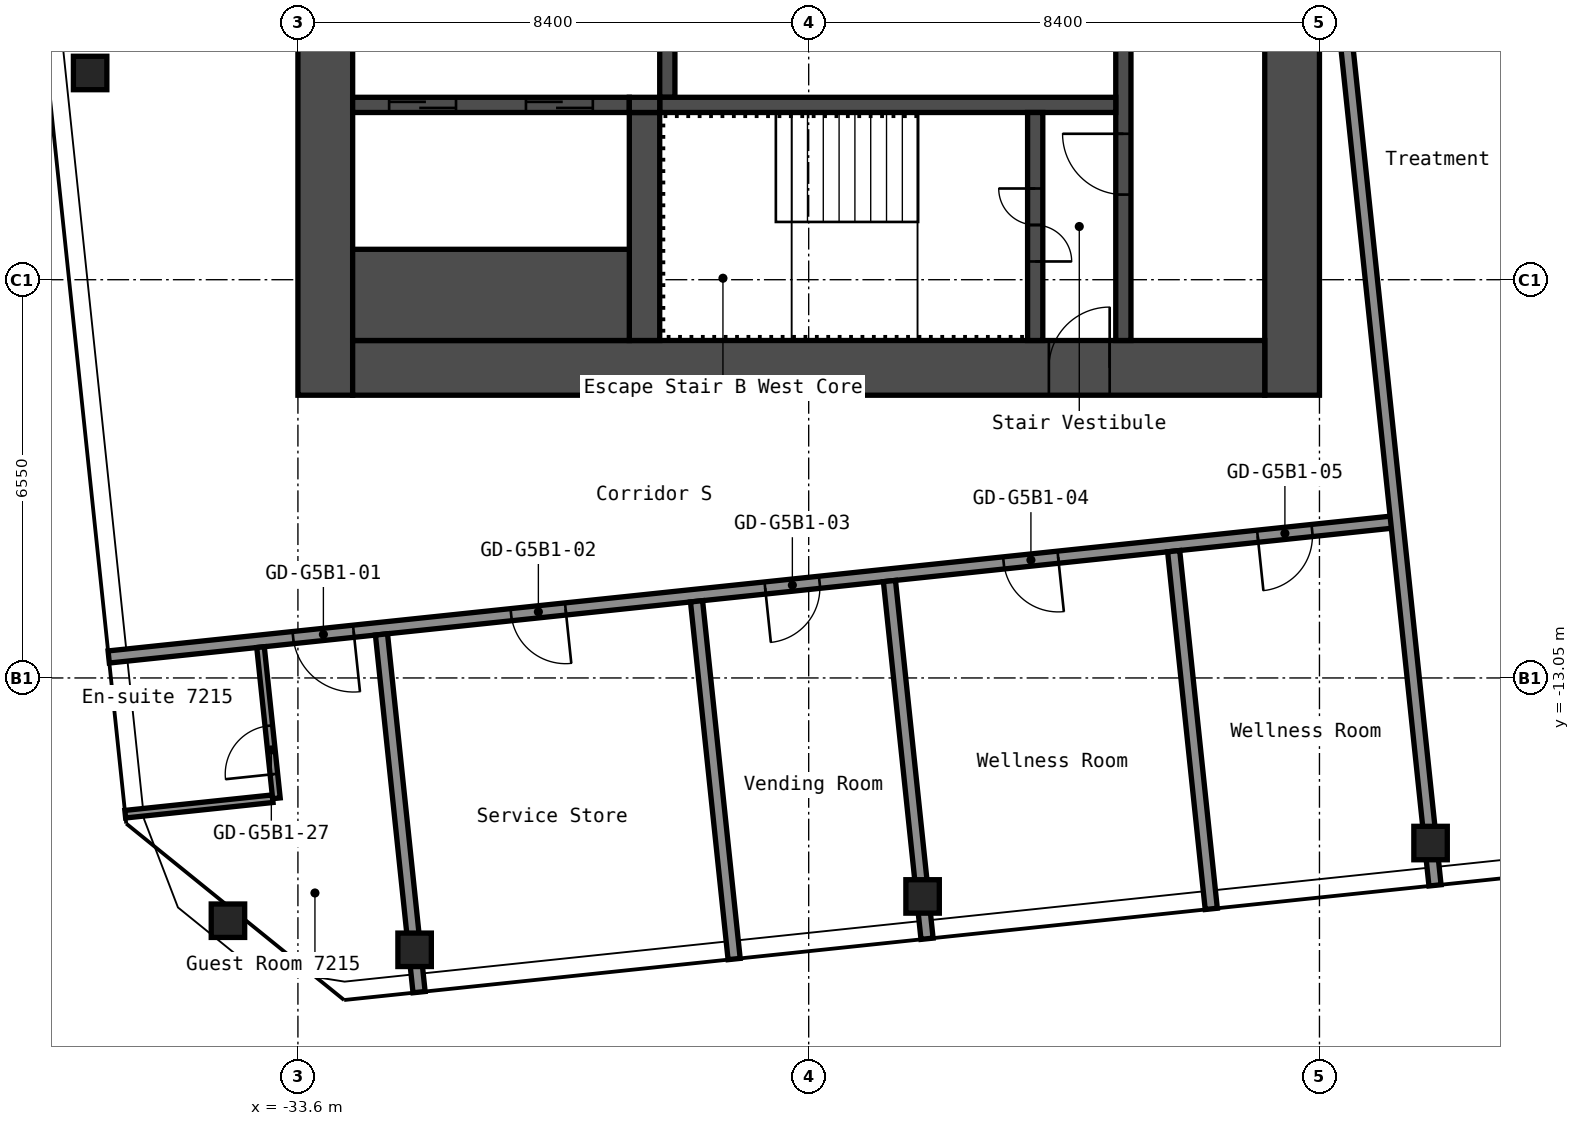
"""IFC4 building model, lengths in metres.
Left out: names, types, materials, properties, quantities, classifications, styles, units other than length and angle.
Written with IfcOpenShell. Run it as: python <this file> out.ifc"""

import sys

from ifc_helpers import new_model, si_unit, direction, frame, frame_2d, origin, origin_2d, place, context, subcontext, project, spatial, rectangle, hollow_rectangle, extrude, element, fill, save


model = new_model("IFC4")
c1 = context("Model", 3, precision=1e-05, world=origin(), true_north=direction((0.0, 1.0)))
c2 = subcontext(c1, "Body", "Model", "MODEL_VIEW")
j1 = project(units=[si_unit("LENGTHUNIT", "METRE"), si_unit("PLANEANGLEUNIT", "RADIAN")], contexts=[c1])
p1 = place(None, origin())
s1 = spatial("IfcSite", under=j1, at=p1, CompositionType="ELEMENT")
p2 = place(p1, origin())
s2 = spatial("IfcBuilding", under=s1, at=p2, CompositionType="ELEMENT")
p3 = place(p2, frame((0.0, 0.0, 255.0)))
s3 = spatial("IfcBuildingStorey", under=s2, at=p3, CompositionType="ELEMENT", Elevation=255.0)
for number, where, z_axis, x_axis in (
    (1, (-34.751, -17.042, 0.0), (0.0, 0.0, 1.0), (1.0, 0.0, 0.0)),
    (2, (-37.017, -3.1, 0.0), (0.0, 0.0, 1.0), (1.0, 0.0, 0.0)),
    (3, (-31.681, -17.521, 0.0), (0.0, 0.0, 1.0), (1.0, 0.0, 0.0)),
    (4, (-23.327, -16.643, 0.0), (0.0, 0.0, 1.0), (1.0, 0.0, 0.0)),
    (5, (-14.973, -15.765, 0.0), (0.0, 0.0, 1.0), (1.0, 0.0, 0.0)),
):
    element("IfcColumn", number, at=place(p3, frame(where, z_axis=z_axis, x_axis=x_axis)), inside=s3, PredefinedType="COLUMN", context=c2, shape_type="SweptSolid", body=[
        extrude(hollow_rectangle(XDim=0.55, YDim=0.55, WallThickness=0.022, InnerFilletRadius=0.033, OuterFilletRadius=0.055, at=origin_2d()), origin(), (0.0, 0.0, 1.0), 2.75),
    ])
p4 = place(p3, frame((-17.25, -8.4, 0.0), z_axis=(0.0, 0.0, 1.0), x_axis=(0.0, 1.0, 0.0)))
e6 = element("IfcWall", 6, at=p4, inside=s3, PredefinedType="SHEAR", context=c2, shape_type="SweptSolid", body=[
    extrude(rectangle(XDim=16.8, YDim=0.9, at=frame_2d((8.4, 0.0))), origin(), (0.0, 0.0, 1.0), 2.75),
])
p5 = place(p4, frame((8.321, 0.0, 0.0)))
e7 = element("IfcOpeningElement", 7, at=p5, cuts=e6, PredefinedType="OPENING", context=c2, shape_type="SweptSolid", body=[
    extrude(rectangle(XDim=1.6, YDim=2.1, at=frame_2d((0.8, 1.05))), frame((0.0, 0.46, 0.0), z_axis=(0.0, -1.0, 0.0), x_axis=(1.0, 0.0, 0.0)), (0.0, 0.0, 1.0), 0.92),
])
p6 = place(p3, frame((-33.15, -8.4, 0.0), z_axis=(0.0, 0.0, 1.0), x_axis=(0.0, 1.0, 0.0)))
e8 = element("IfcWall", 8, at=p6, inside=s3, PredefinedType="SHEAR", context=c2, shape_type="SweptSolid", body=[
    extrude(rectangle(XDim=16.8, YDim=0.9, at=frame_2d((8.4, 0.0))), origin(), (0.0, 0.0, 1.0), 2.75),
])
p7 = place(p3, frame((-32.7, -7.95, 0.0), z_axis=(0.0, 0.0, 1.0), x_axis=(1.0, 0.0, 0.0)))
e9 = element("IfcWall", 9, at=p7, inside=s3, PredefinedType="SHEAR", context=c2, shape_type="SweptSolid", body=[
    extrude(rectangle(XDim=15.0, YDim=0.9, at=frame_2d((7.5, 0.0))), origin(), (0.0, 0.0, 1.0), 2.75),
])
p8 = place(p7, frame((11.45, 0.0, 0.0)))
e10 = element("IfcOpeningElement", 10, at=p8, cuts=e9, PredefinedType="OPENING", context=c2, shape_type="SweptSolid", body=[
    extrude(rectangle(XDim=1.0, YDim=2.1, at=frame_2d((0.5, 1.05))), frame((0.0, 0.46, 0.0), z_axis=(0.0, -1.0, 0.0), x_axis=(1.0, 0.0, 0.0)), (0.0, 0.0, 1.0), 0.92),
])
p9 = place(p3, frame((-20.025, -7.5, 0.0), z_axis=(0.0, 0.0, 1.0), x_axis=(0.0, 1.0, 0.0)))
e11 = element("IfcWall", 11, at=p9, inside=s3, PredefinedType="SHEAR", context=c2, shape_type="SweptSolid", body=[
    extrude(rectangle(XDim=6.3, YDim=0.25, at=frame_2d((3.15, 0.0))), origin(), (0.0, 0.0, 1.0), 2.75),
])
p10 = place(p9, frame((2.4, 0.0, 0.0)))
e12 = element("IfcOpeningElement", 12, at=p10, cuts=e11, PredefinedType="OPENING", context=c2, shape_type="SweptSolid", body=[
    extrude(rectangle(XDim=1.0, YDim=2.1, at=frame_2d((0.5, 1.05))), frame((0.0, 0.135, 0.0), z_axis=(0.0, -1.0, 0.0), x_axis=(1.0, 0.0, 0.0)), (0.0, 0.0, 1.0), 0.27),
])
p11 = place(p3, frame((-27.525, -3.5, 0.0), z_axis=(0.0, 0.0, 1.0), x_axis=(0.0, 1.0, 0.0)))
e13 = element("IfcWall", 13, at=p11, inside=s3, PredefinedType="SHEAR", context=c2, shape_type="SweptSolid", body=[
    extrude(rectangle(XDim=2.05, YDim=0.25, at=frame_2d((1.025, 0.0))), origin(), (0.0, 0.0, 1.0), 2.75),
])
p12 = place(p3, frame((-27.65, -3.625, 0.0), z_axis=(0.0, 0.0, 1.0), x_axis=(1.0, 0.0, 0.0)))
e14 = element("IfcWall", 14, at=p12, inside=s3, PredefinedType="SHEAR", context=c2, shape_type="SweptSolid", body=[
    extrude(rectangle(XDim=7.5, YDim=0.25, at=frame_2d((3.75, 0.0))), origin(), (0.0, 0.0, 1.0), 2.75),
])
p13 = place(p3, frame((-21.475, -7.5, 0.0), z_axis=(0.0, 0.0, 1.0), x_axis=(0.0, 1.0, 0.0)))
e15 = element("IfcWall", 15, at=p13, inside=s3, PredefinedType="SHEAR", context=c2, shape_type="SweptSolid", body=[
    extrude(rectangle(XDim=3.75, YDim=0.25, at=frame_2d((1.875, 0.0))), origin(), (0.0, 0.0, 1.0), 2.75),
])
p14 = place(p13, frame((1.3, 0.0, 0.0)))
e16 = element("IfcOpeningElement", 16, at=p14, cuts=e15, PredefinedType="OPENING", context=c2, shape_type="SweptSolid", body=[
    extrude(rectangle(XDim=1.2, YDim=2.1, at=frame_2d((0.6, 1.05))), frame((0.0, 0.135, 0.0), z_axis=(0.0, -1.0, 0.0), x_axis=(1.0, 0.0, 0.0)), (0.0, 0.0, 1.0), 0.27),
])
p15 = place(p3, frame((-27.9, -7.5, 0.0), z_axis=(0.0, 0.0, 1.0), x_axis=(0.0, 1.0, 0.0)))
e17 = element("IfcWall", 17, at=p15, inside=s3, PredefinedType="SHEAR", context=c2, shape_type="SweptSolid", body=[
    extrude(rectangle(XDim=3.75, YDim=0.5, at=frame_2d((1.875, 0.0))), origin(), (0.0, 0.0, 1.0), 2.75),
])
p16 = place(p3, frame((-32.7, -3.625, 0.0), z_axis=(0.0, 0.0, 1.0), x_axis=(1.0, 0.0, 0.0)))
e18 = element("IfcWall", 18, at=p16, inside=s3, PredefinedType="SHEAR", context=c2, shape_type="SweptSolid", body=[
    extrude(rectangle(XDim=4.55, YDim=0.25, at=frame_2d((2.275, 0.0))), origin(), (0.0, 0.0, 1.0), 2.75),
])
p17 = place(p16, frame((2.85, 0.0, 0.0)))
e19 = element("IfcOpeningElement", 19, at=p17, cuts=e18, PredefinedType="OPENING", context=c2, shape_type="SweptSolid", body=[
    extrude(rectangle(XDim=1.1, YDim=2.1, at=frame_2d((0.55, 1.05))), frame((0.0, 0.135, 0.0), z_axis=(0.0, -1.0, 0.0), x_axis=(1.0, 0.0, 0.0)), (0.0, 0.0, 1.0), 0.27),
])
p18 = place(p16, frame((0.6, 0.0, 0.0)))
e20 = element("IfcOpeningElement", 20, at=p18, cuts=e18, PredefinedType="OPENING", context=c2, shape_type="SweptSolid", body=[
    extrude(rectangle(XDim=1.1, YDim=2.1, at=frame_2d((0.55, 1.05))), frame((0.0, 0.135, 0.0), z_axis=(0.0, -1.0, 0.0), x_axis=(1.0, 0.0, 0.0)), (0.0, 0.0, 1.0), 0.27),
])
p19 = place(p3, frame((-32.7, -6.75, 0.0), z_axis=(0.0, 0.0, 1.0), x_axis=(1.0, 0.0, 0.0)))
e21 = element("IfcWall", 21, at=p19, inside=s3, PredefinedType="SHEAR", context=c2, shape_type="SweptSolid", body=[
    extrude(rectangle(XDim=4.55, YDim=1.5, at=frame_2d((2.275, 0.0))), origin(), (0.0, 0.0, 1.0), 2.75),
])
p20 = place(p3, frame((-28.15, -3.625, 0.0), z_axis=(0.0, 0.0, 1.0), x_axis=(1.0, 0.0, 0.0)))
e22 = element("IfcWall", 22, at=p20, inside=s3, PredefinedType="SHEAR", context=c2, shape_type="SweptSolid", body=[
    extrude(rectangle(XDim=0.5, YDim=0.25, at=frame_2d((0.25, 0.0))), origin(), (0.0, 0.0, 1.0), 2.75),
])
p21 = place(p3, frame((-36.44, -15.291, 0.0), z_axis=(0.0, 0.0, 1.0), x_axis=(0.994517520739, 0.10457007671, 0.0)))
e23 = element("IfcWall", 23, at=p21, inside=s3, PredefinedType="PARTITIONING", context=c2, shape_type="SweptSolid", body=[
    extrude(rectangle(XDim=2.438, YDim=0.125, at=frame_2d((1.219, 0.0))), origin(), (0.0, 0.0, 1.0), 2.75),
])
p22 = place(p3, frame((-36.712, -12.705, 0.0), z_axis=(0.0, 0.0, 1.0), x_axis=(0.994522460242, 0.104523088709, 0.0)))
e24 = element("IfcWall", 24, at=p22, inside=s3, PredefinedType="PARTITIONING", context=c2, shape_type="SweptSolid", body=[
    extrude(rectangle(XDim=21.3, YDim=0.2, at=frame_2d((10.65, 0.0))), origin(), (0.0, 0.0, 1.0), 2.75),
])
p23 = place(p22, frame((3.05, 0.0, 0.0)))
e25 = element("IfcOpeningElement", 25, at=p23, cuts=e24, PredefinedType="OPENING", context=c2, shape_type="SweptSolid", body=[
    extrude(rectangle(XDim=1.0, YDim=2.1, at=frame_2d((0.5, 1.05))), frame((0.0, 0.11, 0.0), z_axis=(0.0, -1.0, 0.0), x_axis=(1.0, 0.0, 0.0)), (0.0, 0.0, 1.0), 0.22),
])
p24 = place(p22, frame((6.655, 0.0, 0.0)))
e26 = element("IfcOpeningElement", 26, at=p24, cuts=e24, PredefinedType="OPENING", context=c2, shape_type="SweptSolid", body=[
    extrude(rectangle(XDim=0.9, YDim=2.1, at=frame_2d((0.45, 1.05))), frame((0.0, 0.11, 0.0), z_axis=(0.0, -1.0, 0.0), x_axis=(1.0, 0.0, 0.0)), (0.0, 0.0, 1.0), 0.22),
])
p25 = place(p22, frame((10.855, 0.0, 0.0)))
e27 = element("IfcOpeningElement", 27, at=p25, cuts=e24, PredefinedType="OPENING", context=c2, shape_type="SweptSolid", body=[
    extrude(rectangle(XDim=0.9, YDim=2.1, at=frame_2d((0.45, 1.05))), frame((0.0, 0.11, 0.0), z_axis=(0.0, -1.0, 0.0), x_axis=(1.0, 0.0, 0.0)), (0.0, 0.0, 1.0), 0.22),
])
p26 = place(p22, frame((14.8, 0.0, 0.0)))
e28 = element("IfcOpeningElement", 28, at=p26, cuts=e24, PredefinedType="OPENING", context=c2, shape_type="SweptSolid", body=[
    extrude(rectangle(XDim=0.9, YDim=2.1, at=frame_2d((0.45, 1.05))), frame((0.0, 0.11, 0.0), z_axis=(0.0, -1.0, 0.0), x_axis=(1.0, 0.0, 0.0)), (0.0, 0.0, 1.0), 0.22),
])
p27 = place(p22, frame((19.0, 0.0, 0.0)))
e29 = element("IfcOpeningElement", 29, at=p27, cuts=e24, PredefinedType="OPENING", context=c2, shape_type="SweptSolid", body=[
    extrude(rectangle(XDim=0.9, YDim=2.1, at=frame_2d((0.45, 1.05))), frame((0.0, 0.11, 0.0), z_axis=(0.0, -1.0, 0.0), x_axis=(1.0, 0.0, 0.0)), (0.0, 0.0, 1.0), 0.22),
])
p28 = place(p3, frame((-33.954, -15.029, 0.0), z_axis=(0.0, 0.0, 1.0), x_axis=(-0.104588199498, 0.994515615024, 0.0)))
e30 = element("IfcWall", 30, at=p28, inside=s3, PredefinedType="PARTITIONING", context=c2, shape_type="SweptSolid", body=[
    extrude(rectangle(XDim=2.5, YDim=0.125, at=frame_2d((1.25, 0.0))), origin(), (0.0, 0.0, 1.0), 2.75),
])
p29 = place(p28, frame((0.4, 0.0, 0.0)))
e31 = element("IfcOpeningElement", 31, at=p29, cuts=e30, PredefinedType="OPENING", context=c2, shape_type="SweptSolid", body=[
    extrude(rectangle(XDim=0.8, YDim=2.1, at=frame_2d((0.4, 1.05))), frame((0.0, 0.073, 0.0), z_axis=(0.0, -1.0, 0.0), x_axis=(1.0, 0.0, 0.0)), (0.0, 0.0, 1.0), 0.145),
])
p30 = place(p3, frame((-31.608, -18.217, 0.0), z_axis=(0.0, 0.0, 1.0), x_axis=(-0.10453655107, 0.994521045273, 0.0)))
e32 = element("IfcWall", 32, at=p30, inside=s3, PredefinedType="PARTITIONING", context=c2, shape_type="SweptSolid", body=[
    extrude(rectangle(XDim=5.916, YDim=0.2, at=frame_2d((2.958, 0.0))), origin(), (0.0, 0.0, 1.0), 2.75),
])
p31 = place(p3, frame((-26.426, -17.673, 0.0), z_axis=(0.0, 0.0, 1.0), x_axis=(-0.104532260673, 0.994521496238, 0.0)))
e33 = element("IfcWall", 33, at=p31, inside=s3, PredefinedType="PARTITIONING", context=c2, shape_type="SweptSolid", body=[
    extrude(rectangle(XDim=5.916, YDim=0.2, at=frame_2d((2.958, 0.0))), origin(), (0.0, 0.0, 1.0), 2.75),
])
p32 = place(p3, frame((-23.254, -17.339, 0.0), z_axis=(0.0, 0.0, 1.0), x_axis=(-0.10453655107, 0.994521045273, 0.0)))
e34 = element("IfcWall", 34, at=p32, inside=s3, PredefinedType="PARTITIONING", context=c2, shape_type="SweptSolid", body=[
    extrude(rectangle(XDim=5.916, YDim=0.2, at=frame_2d((2.958, 0.0))), origin(), (0.0, 0.0, 1.0), 2.75),
])
p33 = place(p3, frame((-18.579, -16.848, 0.0), z_axis=(0.0, 0.0, 1.0), x_axis=(-0.104532260673, 0.994521496238, 0.0)))
e35 = element("IfcWall", 35, at=p33, inside=s3, PredefinedType="PARTITIONING", context=c2, shape_type="SweptSolid", body=[
    extrude(rectangle(XDim=5.916, YDim=0.2, at=frame_2d((2.958, 0.0))), origin(), (0.0, 0.0, 1.0), 2.75),
])
p34 = place(p3, frame((-14.9, -16.461, 0.0), z_axis=(0.0, 0.0, 1.0), x_axis=(-0.104523729364, 0.99452239291, 0.0)))
e36 = element("IfcWall", 36, at=p34, inside=s3, PredefinedType="PARTITIONING", context=c2, shape_type="SweptSolid", body=[
    extrude(rectangle(XDim=15.308, YDim=0.2, at=frame_2d((7.654, 0.0))), origin(), (0.0, 0.0, 1.0), 2.75),
])
p35 = place(p8, origin())
e37 = element("IfcDoor", 37, at=p35, inside=s3, OperationType="SINGLE_SWING_LEFT", PredefinedType="DOOR", context=c2, shape_type="SweptSolid", body=[
    extrude(rectangle(XDim=1.0, YDim=2.1, at=frame_2d((0.5, 1.05))), frame((0.0, 0.025, 0.0), z_axis=(0.0, -1.0, 0.0), x_axis=(1.0, 0.0, 0.0)), (0.0, 0.0, 1.0), 0.05),
])
fill(e10, e37)
p36 = place(p14, origin())
e38 = element("IfcDoor", 38, at=p36, inside=s3, OperationType="DOUBLE_DOOR_SINGLE_SWING", PredefinedType="DOOR", context=c2, shape_type="SweptSolid", body=[
    extrude(rectangle(XDim=1.2, YDim=2.1, at=frame_2d((0.6, 1.05))), frame((0.0, 0.025, 0.0), z_axis=(0.0, -1.0, 0.0), x_axis=(1.0, 0.0, 0.0)), (0.0, 0.0, 1.0), 0.05),
])
fill(e16, e38)
p37 = place(p10, origin())
e39 = element("IfcDoor", 39, at=p37, inside=s3, OperationType="SINGLE_SWING_LEFT", PredefinedType="DOOR", context=c2, shape_type="SweptSolid", body=[
    extrude(rectangle(XDim=1.0, YDim=2.1, at=frame_2d((0.5, 1.05))), frame((0.0, 0.025, 0.0), z_axis=(0.0, -1.0, 0.0), x_axis=(1.0, 0.0, 0.0)), (0.0, 0.0, 1.0), 0.05),
])
fill(e12, e39)
p38 = place(p17, origin())
e40 = element("IfcDoor", 40, at=p38, inside=s3, OperationType="DOUBLE_DOOR_SLIDING", PredefinedType="DOOR", context=c2, shape_type="SweptSolid", body=[
    extrude(rectangle(XDim=1.1, YDim=2.1, at=frame_2d((0.55, 1.05))), frame((0.0, 0.025, 0.0), z_axis=(0.0, -1.0, 0.0), x_axis=(1.0, 0.0, 0.0)), (0.0, 0.0, 1.0), 0.05),
])
fill(e19, e40)
p39 = place(p18, origin())
e41 = element("IfcDoor", 41, at=p39, inside=s3, OperationType="DOUBLE_DOOR_SLIDING", PredefinedType="DOOR", context=c2, shape_type="SweptSolid", body=[
    extrude(rectangle(XDim=1.1, YDim=2.1, at=frame_2d((0.55, 1.05))), frame((0.0, 0.025, 0.0), z_axis=(0.0, -1.0, 0.0), x_axis=(1.0, 0.0, 0.0)), (0.0, 0.0, 1.0), 0.05),
])
fill(e20, e41)
p40 = place(p23, origin())
e42 = element("IfcDoor", 42, at=p40, inside=s3, OperationType="SINGLE_SWING_RIGHT", PredefinedType="DOOR", context=c2, shape_type="SweptSolid", body=[
    extrude(rectangle(XDim=1.0, YDim=2.1, at=frame_2d((0.5, 1.05))), frame((0.0, 0.025, 0.0), z_axis=(0.0, -1.0, 0.0), x_axis=(1.0, 0.0, 0.0)), (0.0, 0.0, 1.0), 0.05),
])
fill(e25, e42)
p41 = place(p24, origin())
e43 = element("IfcDoor", 43, at=p41, inside=s3, OperationType="SINGLE_SWING_RIGHT", PredefinedType="DOOR", context=c2, shape_type="SweptSolid", body=[
    extrude(rectangle(XDim=0.9, YDim=2.1, at=frame_2d((0.45, 1.05))), frame((0.0, 0.025, 0.0), z_axis=(0.0, -1.0, 0.0), x_axis=(1.0, 0.0, 0.0)), (0.0, 0.0, 1.0), 0.05),
])
fill(e26, e43)
p42 = place(p25, origin())
e44 = element("IfcDoor", 44, at=p42, inside=s3, OperationType="SINGLE_SWING_LEFT", PredefinedType="DOOR", context=c2, shape_type="SweptSolid", body=[
    extrude(rectangle(XDim=0.9, YDim=2.1, at=frame_2d((0.45, 1.05))), frame((0.0, 0.025, 0.0), z_axis=(0.0, -1.0, 0.0), x_axis=(1.0, 0.0, 0.0)), (0.0, 0.0, 1.0), 0.05),
])
fill(e27, e44)
p43 = place(p26, origin())
e45 = element("IfcDoor", 45, at=p43, inside=s3, OperationType="SINGLE_SWING_RIGHT", PredefinedType="DOOR", context=c2, shape_type="SweptSolid", body=[
    extrude(rectangle(XDim=0.9, YDim=2.1, at=frame_2d((0.45, 1.05))), frame((0.0, 0.025, 0.0), z_axis=(0.0, -1.0, 0.0), x_axis=(1.0, 0.0, 0.0)), (0.0, 0.0, 1.0), 0.05),
])
fill(e28, e45)
p44 = place(p27, origin())
e46 = element("IfcDoor", 46, at=p44, inside=s3, OperationType="SINGLE_SWING_LEFT", PredefinedType="DOOR", context=c2, shape_type="SweptSolid", body=[
    extrude(rectangle(XDim=0.9, YDim=2.1, at=frame_2d((0.45, 1.05))), frame((0.0, 0.025, 0.0), z_axis=(0.0, -1.0, 0.0), x_axis=(1.0, 0.0, 0.0)), (0.0, 0.0, 1.0), 0.05),
])
fill(e29, e46)
p45 = place(p29, origin())
e47 = element("IfcDoor", 47, at=p45, inside=s3, OperationType="SINGLE_SWING_RIGHT", PredefinedType="DOOR", context=c2, shape_type="SweptSolid", body=[
    extrude(rectangle(XDim=0.8, YDim=2.1, at=frame_2d((0.4, 1.05))), frame((0.0, 0.025, 0.0), z_axis=(0.0, -1.0, 0.0), x_axis=(1.0, 0.0, 0.0)), (0.0, 0.0, 1.0), 0.05),
])
fill(e31, e47)
save(model, sys.argv[1])
